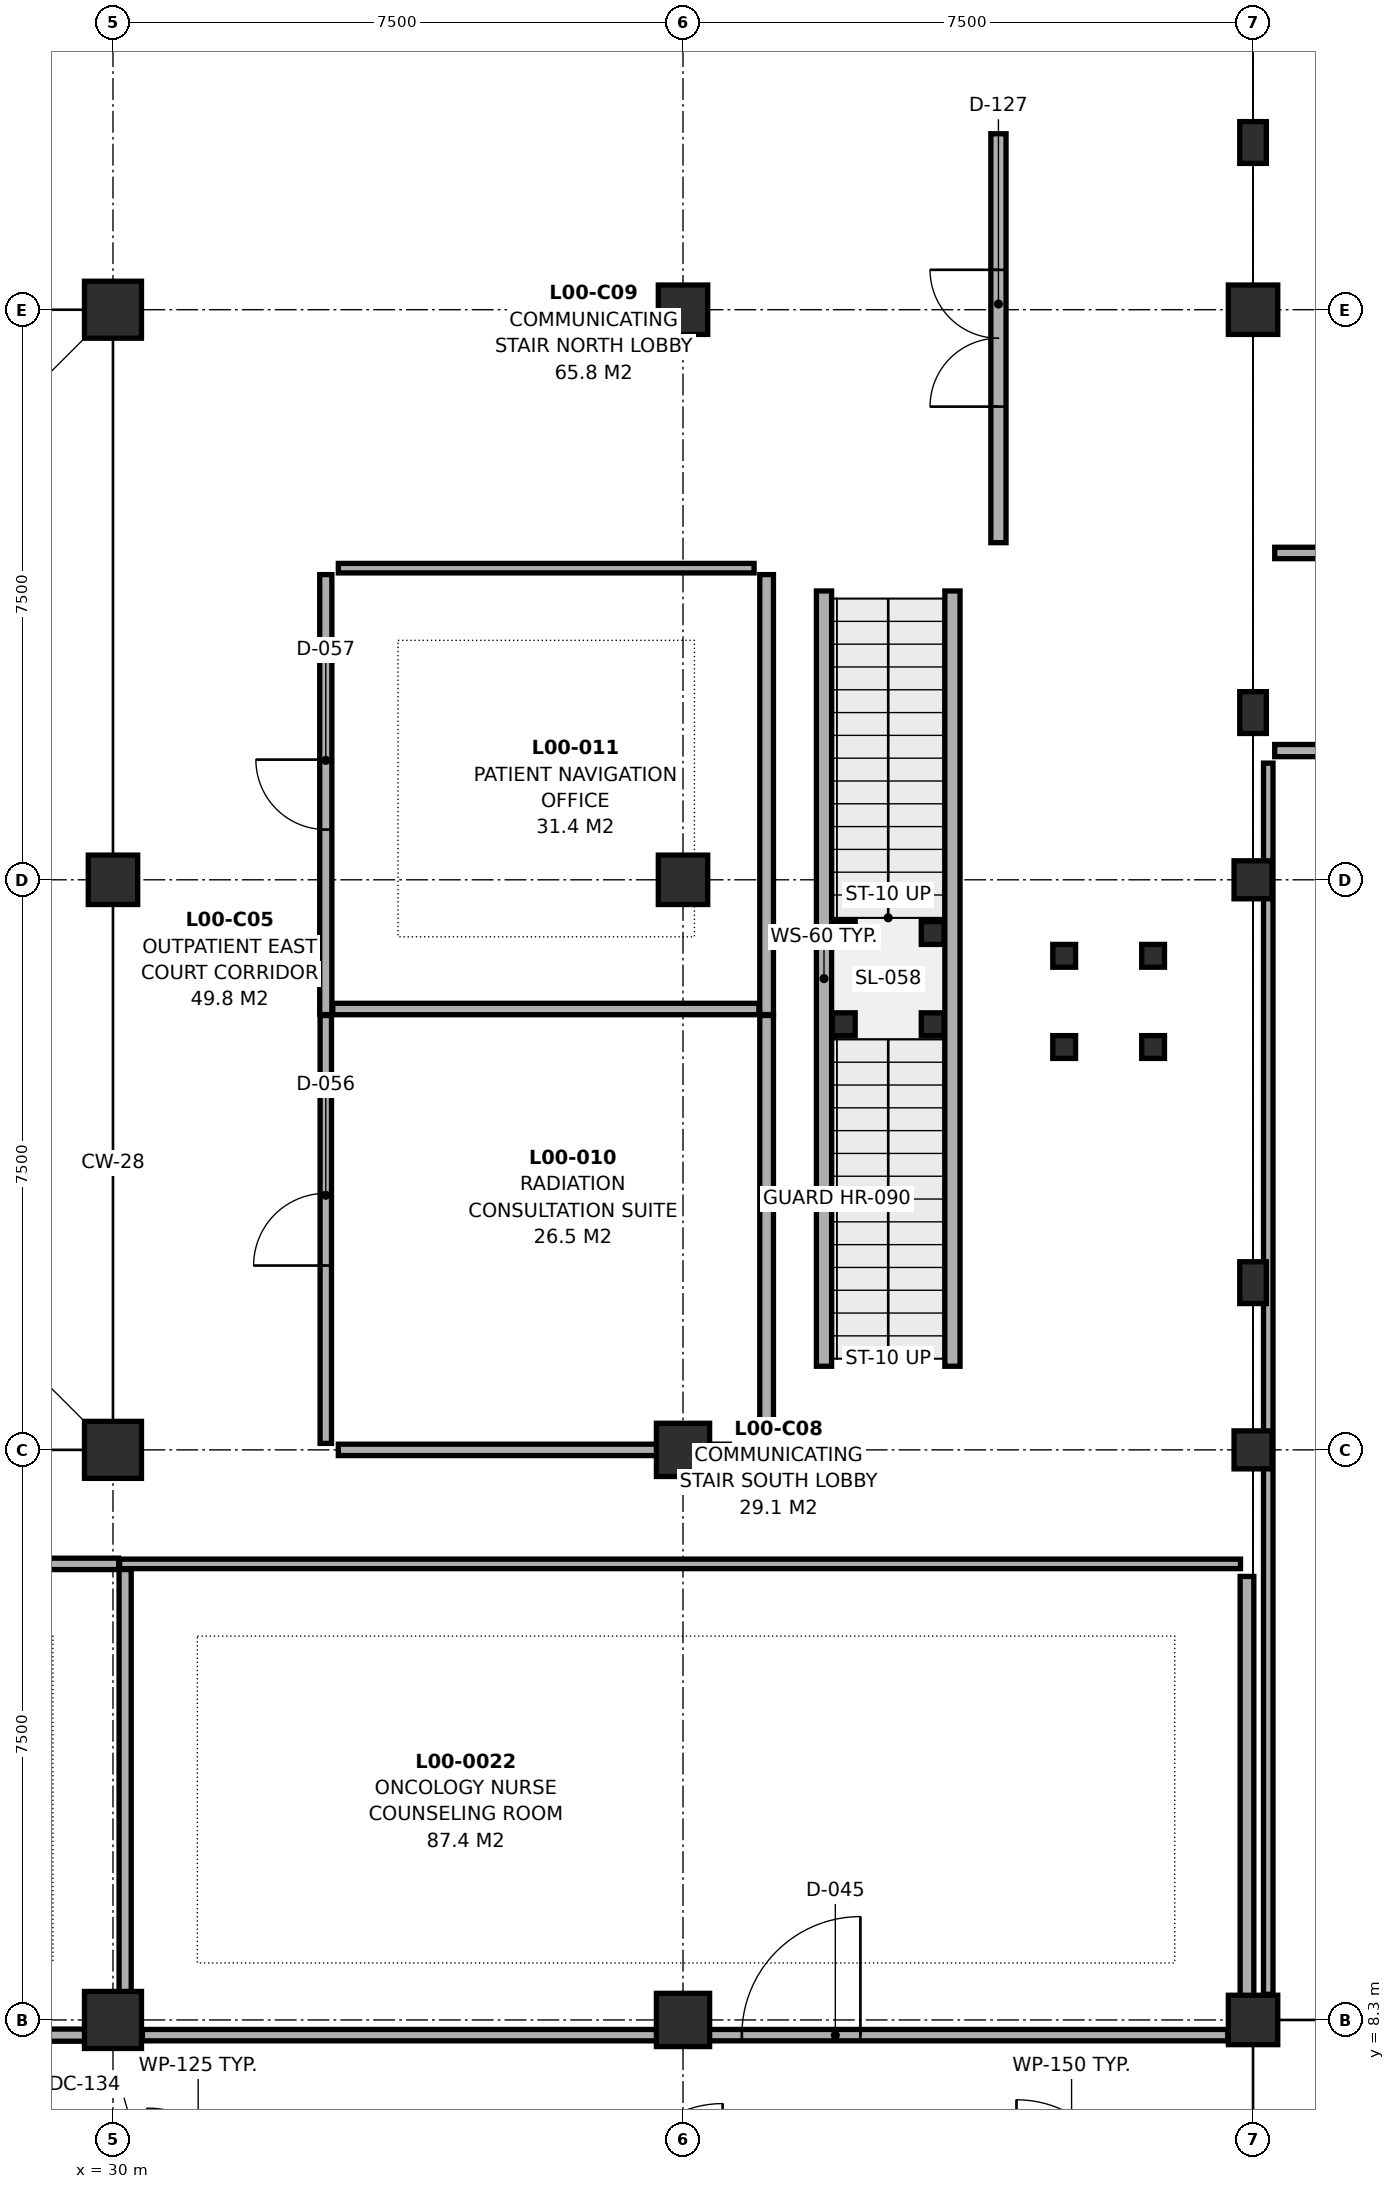
"""IFC4 building model, lengths in metres.
Left out: names, types, materials, properties, quantities, classifications, styles, units other than length and angle.
Written with IfcOpenShell. Run it as: python <this file> out.ifc"""

import sys

from ifc_helpers import new_model, si_unit, direction, frame, frame_2d, origin, origin_2d, place, context, subcontext, project, spatial, rectangle, i_section, extrude, element, fill, save


model = new_model("IFC4")
c1 = context("Model", 3, precision=1e-05, world=origin(), true_north=direction((0.0, 1.0)))
c2 = subcontext(c1, "Body", "Model", "MODEL_VIEW")
j1 = project(units=[si_unit("LENGTHUNIT", "METRE"), si_unit("PLANEANGLEUNIT", "RADIAN")], contexts=[c1])
p1 = place(None, origin())
s1 = spatial("IfcSite", under=j1, at=p1, CompositionType="ELEMENT")
p2 = place(p1, origin())
s2 = spatial("IfcBuilding", under=s1, at=p2, CompositionType="ELEMENT")
p3 = place(p2, origin())
s3 = spatial("IfcBuildingStorey", under=s2, at=p3, CompositionType="ELEMENT", Elevation=0.0)
for number, where, z_axis, x_axis in (
    (1, (30.0, 8.3, 0.0), (0.0, 0.0, 1.0), (1.0, 0.0, 0.0)),
    (2, (30.0, 15.8, 0.0), (0.0, 0.0, 1.0), (1.0, 0.0, 0.0)),
):
    element("IfcColumn", number, at=place(p3, frame(where, z_axis=z_axis, x_axis=x_axis)), inside=s3, PredefinedType="COLUMN", context=c2, shape_type="SweptSolid", body=[
        extrude(rectangle(XDim=0.75, YDim=0.75, at=origin_2d()), origin(), (0.0, 0.0, 1.0), 4.7),
    ])
p4 = place(p3, frame((30.0, 23.3, 0.0), z_axis=(0.0, 0.0, 1.0), x_axis=(1.0, 0.0, 0.0)))
e3 = element("IfcColumn", 3, at=p4, inside=s3, PredefinedType="COLUMN", context=c2, shape_type="SweptSolid", body=[
    extrude(rectangle(XDim=0.65, YDim=0.65, at=origin_2d()), origin(), (0.0, 0.0, 1.0), 4.7),
])
p5 = place(p3, frame((30.0, 30.8, 0.0), z_axis=(0.0, 0.0, 1.0), x_axis=(1.0, 0.0, 0.0)))
e4 = element("IfcColumn", 4, at=p5, inside=s3, PredefinedType="COLUMN", context=c2, shape_type="SweptSolid", body=[
    extrude(rectangle(XDim=0.75, YDim=0.75, at=origin_2d()), origin(), (0.0, 0.0, 1.0), 4.7),
])
for number, where, z_axis, x_axis in (
    (5, (37.5, 8.3, 0.0), (0.0, 0.0, 1.0), (1.0, 0.0, 0.0)),
    (6, (37.5, 15.8, 0.0), (0.0, 0.0, 1.0), (1.0, 0.0, 0.0)),
):
    element("IfcColumn", number, at=place(p3, frame(where, z_axis=z_axis, x_axis=x_axis)), inside=s3, PredefinedType="COLUMN", context=c2, shape_type="SweptSolid", body=[
        extrude(rectangle(XDim=0.7, YDim=0.7, at=origin_2d()), origin(), (0.0, 0.0, 1.0), 4.7),
    ])
for number, where, z_axis, x_axis in (
    (7, (37.5, 23.3, 0.0), (0.0, 0.0, 1.0), (1.0, 0.0, 0.0)),
    (8, (37.5, 30.8, 0.0), (0.0, 0.0, 1.0), (1.0, 0.0, 0.0)),
    (9, (45.0, 8.3, 0.0), (0.0, 0.0, 1.0), (1.0, 0.0, 0.0)),
):
    element("IfcColumn", number, at=place(p3, frame(where, z_axis=z_axis, x_axis=x_axis)), inside=s3, PredefinedType="COLUMN", context=c2, shape_type="SweptSolid", body=[
        extrude(rectangle(XDim=0.65, YDim=0.65, at=origin_2d()), origin(), (0.0, 0.0, 1.0), 4.7),
    ])
for number, where, z_axis, x_axis in (
    (10, (45.0, 15.8, 0.0), (0.0, 0.0, 1.0), (1.0, 0.0, 0.0)),
    (11, (45.0, 23.3, 0.0), (0.0, 0.0, 1.0), (1.0, 0.0, 0.0)),
):
    element("IfcColumn", number, at=place(p3, frame(where, z_axis=z_axis, x_axis=x_axis)), inside=s3, PredefinedType="COLUMN", context=c2, shape_type="SweptSolid", body=[
        extrude(rectangle(XDim=0.5, YDim=0.5, at=origin_2d()), origin(), (0.0, 0.0, 1.0), 6.138),
    ])
p6 = place(p3, frame((45.0, 30.8, 0.0), z_axis=(0.0, 0.0, 1.0), x_axis=(1.0, 0.0, 0.0)))
e12 = element("IfcColumn", 12, at=p6, inside=s3, PredefinedType="COLUMN", context=c2, shape_type="SweptSolid", body=[
    extrude(rectangle(XDim=0.65, YDim=0.65, at=origin_2d()), origin(), (0.0, 0.0, 1.0), 4.7),
])
for number, where, z_axis, x_axis in (
    (13, (45.0, 18.0, 0.0), (0.0, 0.0, 1.0), (1.0, 0.0, 0.0)),
    (14, (45.0, 25.5, 0.0), (0.0, 0.0, 1.0), (1.0, 0.0, 0.0)),
    (15, (45.0, 33.0, 0.0), (0.0, 0.0, 1.0), (1.0, 0.0, 0.0)),
):
    element("IfcColumn", number, at=place(p3, frame(where, z_axis=z_axis, x_axis=x_axis)), inside=s3, PredefinedType="PILASTER", context=c2, shape_type="SweptSolid", body=[
        extrude(rectangle(XDim=0.35, YDim=0.55, at=origin_2d()), origin(), (0.0, 0.0, 1.0), 4.7),
    ])
for number, where, z_axis, x_axis in (
    (16, (39.355, 16.9, 0.0), (0.0, 0.0, 1.0), (0.0, 1.0, 0.0)),
    (17, (41.045, 16.9, 0.0), (0.0, 0.0, 1.0), (0.0, 1.0, 0.0)),
):
    element("IfcWall", number, at=place(p3, frame(where, z_axis=z_axis, x_axis=x_axis)), inside=s3, PredefinedType="PARTITIONING", context=c2, shape_type="SweptSolid", body=[
        extrude(rectangle(XDim=10.2, YDim=0.2, at=frame_2d((5.1, 0.0))), origin(), (0.0, 0.0, 1.0), 2.3),
    ])
for number, where, z_axis, x_axis in (
    (18, (39.615, 21.4, 0.0), (0.0, 0.0, 1.0), (1.0, 0.0, 0.0)),
    (19, (40.785, 21.4, 0.0), (0.0, 0.0, 1.0), (1.0, 0.0, 0.0)),
    (20, (40.785, 22.6, 0.0), (0.0, 0.0, 1.0), (1.0, 0.0, 0.0)),
    (21, (39.615, 22.6, 0.0), (0.0, 0.0, 1.0), (1.0, 0.0, 0.0)),
):
    element("IfcColumn", number, at=place(p3, frame(where, z_axis=z_axis, x_axis=x_axis)), inside=s3, PredefinedType="COLUMN", context=c2, shape_type="SweptSolid", body=[
        extrude(i_section(OverallWidth=0.3, OverallDepth=0.3, WebThickness=0.011, FlangeThickness=0.019, FilletRadius=0.027, at=origin_2d()), origin(), (0.0, 0.0, 1.0), 2.3),
    ])
for number, where, z_axis, x_axis in (
    (22, (42.515, 21.1, 0.0), (0.0, 0.0, 1.0), (1.0, 0.0, 0.0)),
    (23, (43.685, 21.1, 0.0), (0.0, 0.0, 1.0), (1.0, 0.0, 0.0)),
    (24, (43.685, 22.3, 0.0), (0.0, 0.0, 1.0), (1.0, 0.0, 0.0)),
    (25, (42.515, 22.3, 0.0), (0.0, 0.0, 1.0), (1.0, 0.0, 0.0)),
):
    element("IfcColumn", number, at=place(p3, frame(where, z_axis=z_axis, x_axis=x_axis)), inside=s3, PredefinedType="COLUMN", context=c2, shape_type="SweptSolid", body=[
        extrude(i_section(OverallWidth=0.3, OverallDepth=0.3, WebThickness=0.011, FlangeThickness=0.019, FilletRadius=0.027, at=origin_2d()), origin(), (0.0, 0.0, 1.0), 4.7),
    ])
p7 = place(p3, frame((15.387, 8.1, 0.0), z_axis=(0.0, 0.0, 1.0), x_axis=(1.0, 0.0, 0.0)))
e26 = element("IfcWall", 26, at=p7, inside=s3, PredefinedType="PARTITIONING", context=c2, shape_type="SweptSolid", body=[
    extrude(rectangle(XDim=14.521, YDim=0.16, at=frame_2d((7.26, 0.0))), origin(), (0.0, 0.0, 1.0), 3.765),
])
p8 = place(p7, frame((7.682, 0.0, 0.0)))
e27 = element("IfcOpeningElement", 27, at=p8, cuts=e26, PredefinedType="OPENING", context=c2, shape_type="SweptSolid", body=[
    extrude(rectangle(XDim=1.5, YDim=2.28, at=frame_2d((0.75, 1.14))), frame((0.0, 0.092, 0.0), z_axis=(0.0, -1.0, 0.0), x_axis=(1.0, 0.0, 0.0)), (0.0, 0.0, 1.0), 0.184),
])
p9 = place(p3, frame((30.387, 8.1, 0.0), z_axis=(0.0, 0.0, 1.0), x_axis=(1.0, 0.0, 0.0)))
e28 = element("IfcWall", 28, at=p9, inside=s3, PredefinedType="PARTITIONING", context=c2, shape_type="SweptSolid", body=[
    extrude(rectangle(XDim=14.281, YDim=0.15, at=frame_2d((7.141, 0.0))), origin(), (0.0, 0.0, 1.0), 3.985),
])
p10 = place(p9, frame((7.887, 0.0, 0.0)))
e29 = element("IfcOpeningElement", 29, at=p10, cuts=e28, PredefinedType="OPENING", context=c2, shape_type="SweptSolid", body=[
    extrude(rectangle(XDim=1.56, YDim=2.3, at=frame_2d((0.78, 1.15))), frame((0.0, 0.087, 0.0), z_axis=(0.0, -1.0, 0.0), x_axis=(1.0, 0.0, 0.0)), (0.0, 0.0, 1.0), 0.174),
])
p11 = place(p3, frame((41.65, 27.735, 0.0), z_axis=(0.0, 0.0, 1.0), x_axis=(0.0, 1.0, 0.0)))
e30 = element("IfcWall", 30, at=p11, inside=s3, PredefinedType="PARTITIONING", context=c2, shape_type="SweptSolid", body=[
    extrude(rectangle(XDim=5.38, YDim=0.2, at=frame_2d((2.69, 0.0))), origin(), (0.0, 0.0, 1.0), 3.985),
])
p12 = place(p11, frame((1.79, 0.0, 0.0)))
e31 = element("IfcOpeningElement", 31, at=p12, cuts=e30, PredefinedType="OPENING", context=c2, shape_type="SweptSolid", body=[
    extrude(rectangle(XDim=1.8, YDim=2.15, at=frame_2d((0.9, 1.075))), frame((0.0, 0.112, 0.0), z_axis=(0.0, -1.0, 0.0), x_axis=(1.0, 0.0, 0.0)), (0.0, 0.0, 1.0), 0.224),
])
p13 = place(p3, frame((32.8, 15.885, 0.0), z_axis=(0.0, 0.0, 1.0), x_axis=(0.0, 1.0, 0.0)))
e32 = element("IfcWall", 32, at=p13, inside=s3, PredefinedType="PARTITIONING", context=c2, shape_type="SweptSolid", body=[
    extrude(rectangle(XDim=5.63, YDim=0.15, at=frame_2d((2.815, 0.0))), origin(), (0.0, 0.0, 1.0), 3.985),
])
p14 = place(p13, frame((2.34, 0.0, 0.0)))
e33 = element("IfcOpeningElement", 33, at=p14, cuts=e32, PredefinedType="OPENING", context=c2, shape_type="SweptSolid", body=[
    extrude(rectangle(XDim=0.95, YDim=2.15, at=frame_2d((0.475, 1.075))), frame((0.0, 0.087, 0.0), z_axis=(0.0, -1.0, 0.0), x_axis=(1.0, 0.0, 0.0)), (0.0, 0.0, 1.0), 0.174),
])
p15 = place(p3, frame((32.8, 21.527, 0.0), z_axis=(0.0, 0.0, 1.0), x_axis=(0.0, 1.0, 0.0)))
e34 = element("IfcWall", 34, at=p15, inside=s3, PredefinedType="PARTITIONING", context=c2, shape_type="SweptSolid", body=[
    extrude(rectangle(XDim=5.788, YDim=0.16, at=frame_2d((2.894, 0.0))), origin(), (0.0, 0.0, 1.0), 3.985),
])
p16 = place(p15, frame((2.434, 0.0, 0.0)))
e35 = element("IfcOpeningElement", 35, at=p16, cuts=e34, PredefinedType="OPENING", context=c2, shape_type="SweptSolid", body=[
    extrude(rectangle(XDim=0.92, YDim=2.1, at=frame_2d((0.46, 1.05))), frame((0.0, 0.092, 0.0), z_axis=(0.0, -1.0, 0.0), x_axis=(1.0, 0.0, 0.0)), (0.0, 0.0, 1.0), 0.184),
])
p17 = place(p3, frame((45.285, 25.0, 0.0), z_axis=(0.0, 0.0, 1.0), x_axis=(1.0, 0.0, 0.0)))
e36 = element("IfcWall", 36, at=p17, inside=s3, PredefinedType="PARTITIONING", context=c2, shape_type="SweptSolid", body=[
    extrude(rectangle(XDim=7.13, YDim=0.16, at=frame_2d((3.565, 0.0))), origin(), (0.0, 0.0, 1.0), 4.321),
])
p18 = place(p17, frame((3.025, 0.0, 0.0)))
e37 = element("IfcOpeningElement", 37, at=p18, cuts=e36, PredefinedType="OPENING", context=c2, shape_type="SweptSolid", body=[
    extrude(rectangle(XDim=1.08, YDim=2.18, at=frame_2d((0.54, 1.09))), frame((0.0, 0.092, 0.0), z_axis=(0.0, -1.0, 0.0), x_axis=(1.0, 0.0, 0.0)), (0.0, 0.0, 1.0), 0.184),
])
p19 = place(p3, frame((45.285, 27.6, 0.0), z_axis=(0.0, 0.0, 1.0), x_axis=(1.0, 0.0, 0.0)))
e38 = element("IfcWall", 38, at=p19, inside=s3, PredefinedType="PARTITIONING", context=c2, shape_type="SweptSolid", body=[
    extrude(rectangle(XDim=5.03, YDim=0.15, at=frame_2d((2.515, 0.0))), origin(), (0.0, 0.0, 1.0), 4.7),
])
p20 = place(p19, frame((1.895, 0.0, 0.0)))
e39 = element("IfcOpeningElement", 39, at=p20, cuts=e38, PredefinedType="OPENING", context=c2, shape_type="SweptSolid", body=[
    extrude(rectangle(XDim=1.24, YDim=2.2, at=frame_2d((0.62, 1.1))), frame((0.0, 0.087, 0.0), z_axis=(0.0, -1.0, 0.0), x_axis=(1.0, 0.0, 0.0)), (0.0, 0.0, 1.0), 0.174),
])
p21 = place(p3, frame((15.485, 14.3, 0.0), z_axis=(0.0, 0.0, 1.0), x_axis=(1.0, 0.0, 0.0)))
e40 = element("IfcWall", 40, at=p21, inside=s3, PredefinedType="PARTITIONING", context=c2, shape_type="SweptSolid", body=[
    extrude(rectangle(XDim=14.59, YDim=0.15, at=frame_2d((7.295, 0.0))), origin(), (0.0, 0.0, 1.0), 3.765),
])
p22 = place(p3, frame((30.087, 14.3, 0.0), z_axis=(0.0, 0.0, 1.0), x_axis=(1.0, 0.0, 0.0)))
e41 = element("IfcWall", 41, at=p22, inside=s3, PredefinedType="PARTITIONING", context=c2, shape_type="SweptSolid", body=[
    extrude(rectangle(XDim=14.748, YDim=0.125, at=frame_2d((7.374, 0.0))), origin(), (0.0, 0.0, 1.0), 3.985),
])
p23 = place(p3, frame((38.6, 15.885, 0.0), z_axis=(0.0, 0.0, 1.0), x_axis=(0.0, 1.0, 0.0)))
e42 = element("IfcWall", 42, at=p23, inside=s3, PredefinedType="PARTITIONING", context=c2, shape_type="SweptSolid", body=[
    extrude(rectangle(XDim=5.63, YDim=0.18, at=frame_2d((2.815, 0.0))), origin(), (0.0, 0.0, 1.0), 4.7),
])
p24 = place(p3, frame((38.6, 21.527, 0.0), z_axis=(0.0, 0.0, 1.0), x_axis=(0.0, 1.0, 0.0)))
e43 = element("IfcWall", 43, at=p24, inside=s3, PredefinedType="PARTITIONING", context=c2, shape_type="SweptSolid", body=[
    extrude(rectangle(XDim=5.788, YDim=0.18, at=frame_2d((2.894, 0.0))), origin(), (0.0, 0.0, 1.0), 4.7),
])
p25 = place(p3, frame((30.16, 8.432, 0.0), z_axis=(0.0, 0.0, 1.0), x_axis=(0.0, 1.0, 0.0)))
e44 = element("IfcWall", 44, at=p25, inside=s3, PredefinedType="PARTITIONING", context=c2, shape_type="SweptSolid", body=[
    extrude(rectangle(XDim=5.794, YDim=0.16, at=frame_2d((2.897, 0.0))), origin(), (0.0, 0.0, 1.0), 3.985),
])
p26 = place(p3, frame((44.92, 8.432, 0.0), z_axis=(0.0, 0.0, 1.0), x_axis=(0.0, 1.0, 0.0)))
e45 = element("IfcWall", 45, at=p26, inside=s3, PredefinedType="PARTITIONING", context=c2, shape_type="SweptSolid", body=[
    extrude(rectangle(XDim=5.703, YDim=0.18, at=frame_2d((2.852, 0.0))), origin(), (0.0, 0.0, 1.0), 3.985),
])
p27 = place(p3, frame((32.965, 15.8, 0.0), z_axis=(0.0, 0.0, 1.0), x_axis=(1.0, 0.0, 0.0)))
e46 = element("IfcWall", 46, at=p27, inside=s3, PredefinedType="PARTITIONING", context=c2, shape_type="SweptSolid", body=[
    extrude(rectangle(XDim=5.47, YDim=0.15, at=frame_2d((2.735, 0.0))), origin(), (0.0, 0.0, 1.0), 3.985),
])
p28 = place(p3, frame((32.892, 21.6, 0.0), z_axis=(0.0, 0.0, 1.0), x_axis=(1.0, 0.0, 0.0)))
e47 = element("IfcWall", 47, at=p28, inside=s3, PredefinedType="PARTITIONING", context=c2, shape_type="SweptSolid", body=[
    extrude(rectangle(XDim=5.606, YDim=0.15, at=frame_2d((2.803, 0.0))), origin(), (0.0, 0.0, 1.0), 3.985),
])
p29 = place(p3, frame((32.965, 27.4, 0.0), z_axis=(0.0, 0.0, 1.0), x_axis=(1.0, 0.0, 0.0)))
e48 = element("IfcWall", 48, at=p29, inside=s3, PredefinedType="PARTITIONING", context=c2, shape_type="SweptSolid", body=[
    extrude(rectangle(XDim=5.47, YDim=0.125, at=frame_2d((2.735, 0.0))), origin(), (0.0, 0.0, 1.0), 3.985),
])
p30 = place(p3, frame((45.2, 8.637, 0.0), z_axis=(0.0, 0.0, 1.0), x_axis=(0.0, 1.0, 0.0)))
e49 = element("IfcWall", 49, at=p30, inside=s3, PredefinedType="PARTITIONING", context=c2, shape_type="SweptSolid", body=[
    extrude(rectangle(XDim=16.198, YDim=0.125, at=frame_2d((8.099, 0.0))), origin(), (0.0, 0.0, 1.0), 3.985),
])
p31 = place(p10, origin())
e50 = element("IfcDoor", 50, at=p31, inside=s3, OperationType="SINGLE_SWING_RIGHT", PredefinedType="DOOR", context=c2, shape_type="SweptSolid", body=[
    extrude(rectangle(XDim=1.56, YDim=2.3, at=frame_2d((0.78, 1.15))), frame((0.0, 0.025, 0.0), z_axis=(0.0, -1.0, 0.0), x_axis=(1.0, 0.0, 0.0)), (0.0, 0.0, 1.0), 0.05),
])
fill(e29, e50)
p32 = place(p12, origin())
e51 = element("IfcDoor", 51, at=p32, inside=s3, OperationType="DOUBLE_DOOR_SINGLE_SWING", PredefinedType="DOOR", context=c2, shape_type="SweptSolid", body=[
    extrude(rectangle(XDim=1.8, YDim=2.15, at=frame_2d((0.9, 1.075))), frame((0.0, 0.025, 0.0), z_axis=(0.0, -1.0, 0.0), x_axis=(1.0, 0.0, 0.0)), (0.0, 0.0, 1.0), 0.05),
])
fill(e31, e51)
p33 = place(p14, origin())
e52 = element("IfcDoor", 52, at=p33, inside=s3, OperationType="SINGLE_SWING_LEFT", PredefinedType="DOOR", context=c2, shape_type="SweptSolid", body=[
    extrude(rectangle(XDim=0.95, YDim=2.15, at=frame_2d((0.475, 1.075))), frame((0.0, 0.025, 0.0), z_axis=(0.0, -1.0, 0.0), x_axis=(1.0, 0.0, 0.0)), (0.0, 0.0, 1.0), 0.05),
])
fill(e33, e52)
p34 = place(p16, origin())
e53 = element("IfcDoor", 53, at=p34, inside=s3, OperationType="SINGLE_SWING_RIGHT", PredefinedType="DOOR", context=c2, shape_type="SweptSolid", body=[
    extrude(rectangle(XDim=0.92, YDim=2.1, at=frame_2d((0.46, 1.05))), frame((0.0, 0.025, 0.0), z_axis=(0.0, -1.0, 0.0), x_axis=(1.0, 0.0, 0.0)), (0.0, 0.0, 1.0), 0.05),
])
fill(e35, e53)
save(model, sys.argv[1])
